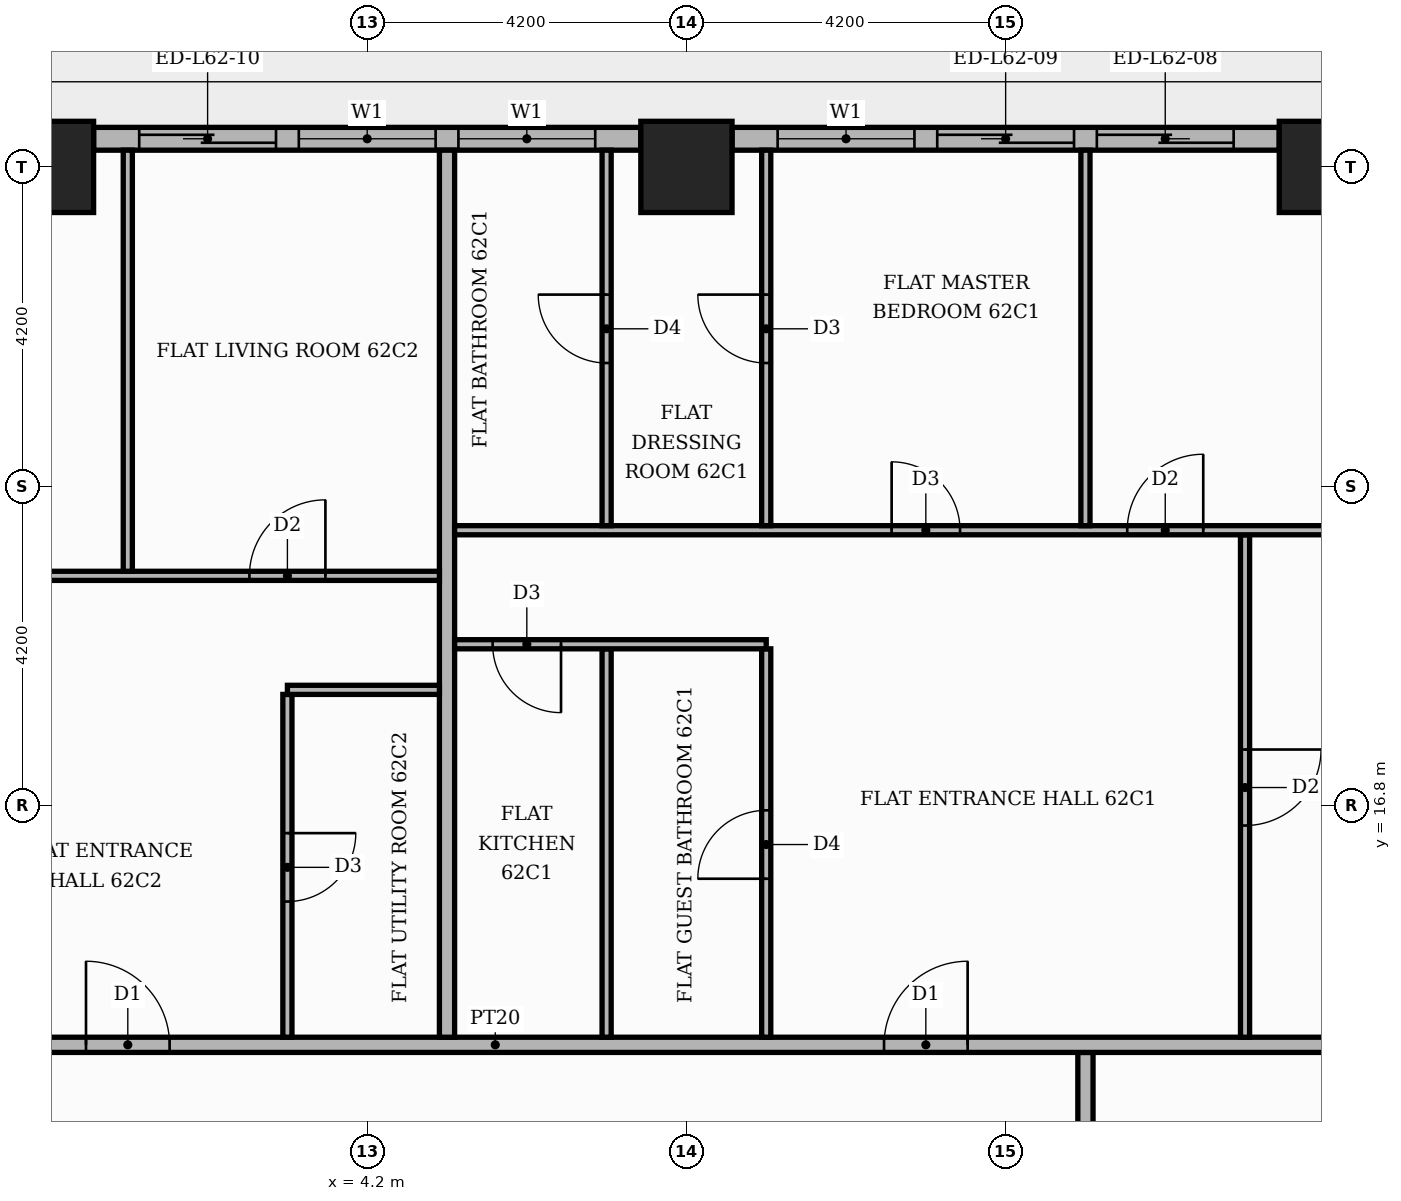
"""IFC4 building model, lengths in metres.
Left out: names, types, materials, properties, quantities, classifications, styles, units other than length and angle.
Written with IfcOpenShell. Run it as: python <this file> out.ifc"""

import sys

from ifc_helpers import new_model, si_unit, direction, frame, frame_2d, origin, origin_2d, place, context, subcontext, project, spatial, rectangle, extrude, element, fill, save


model = new_model("IFC4")
c1 = context("Model", 3, precision=1e-05, world=origin(), true_north=direction((0.0, 1.0)))
c2 = subcontext(c1, "Body", "Model", "MODEL_VIEW")
j1 = project(units=[si_unit("LENGTHUNIT", "METRE"), si_unit("PLANEANGLEUNIT", "RADIAN")], contexts=[c1])
p1 = place(None, origin())
s1 = spatial("IfcSite", under=j1, at=p1, CompositionType="ELEMENT")
p2 = place(p1, origin())
s2 = spatial("IfcBuilding", under=s1, at=p2, CompositionType="ELEMENT")
p3 = place(p2, frame((0.0, 0.0, 260.1)))
s3 = spatial("IfcBuildingStorey", under=s2, at=p3, CompositionType="ELEMENT", Elevation=260.1)
for number, where, z_axis, x_axis in (
    (1, (0.0, 25.2, 0.0), (0.0, 0.0, 1.0), (1.0, 0.0, 0.0)),
    (2, (8.4, 25.2, 0.0), (0.0, 0.0, 1.0), (1.0, 0.0, 0.0)),
    (3, (16.8, 25.2, 0.0), (0.0, 0.0, 1.0), (1.0, 0.0, 0.0)),
):
    element("IfcColumn", number, at=place(p3, frame(where, z_axis=z_axis, x_axis=x_axis)), inside=s3, PredefinedType="COLUMN", context=c2, shape_type="SweptSolid", body=[
        extrude(rectangle(XDim=1.2, YDim=1.2, at=origin_2d()), origin(), (0.0, 0.0, 1.0), 3.9),
    ])
p4 = place(p3, frame((16.2, 25.57, 0.0), z_axis=(0.0, 0.0, 1.0), x_axis=(-1.0, 0.0, 0.0)))
e4 = element("IfcWall", 4, at=p4, inside=s3, PredefinedType="STANDARD", context=c2, shape_type="SweptSolid", body=[
    extrude(rectangle(XDim=7.2, YDim=0.3, at=frame_2d((3.6, 0.0))), origin(), (0.0, 0.0, 1.0), 3.48),
])
p5 = place(p4, frame((0.6, 0.0, 0.0)))
e5 = element("IfcOpeningElement", 5, at=p5, cuts=e4, PredefinedType="OPENING", context=c2, shape_type="SweptSolid", body=[
    extrude(rectangle(XDim=1.8, YDim=2.4, at=frame_2d((0.9, 1.2))), frame((0.0, 0.16, 0.0), z_axis=(0.0, -1.0, 0.0), x_axis=(1.0, 0.0, 0.0)), (0.0, 0.0, 1.0), 0.32),
])
p6 = place(p4, frame((2.7, 0.0, 0.0)))
e6 = element("IfcOpeningElement", 6, at=p6, cuts=e4, PredefinedType="OPENING", context=c2, shape_type="SweptSolid", body=[
    extrude(rectangle(XDim=1.8, YDim=2.4, at=frame_2d((0.9, 1.2))), frame((0.0, 0.16, 0.0), z_axis=(0.0, -1.0, 0.0), x_axis=(1.0, 0.0, 0.0)), (0.0, 0.0, 1.0), 0.32),
])
p7 = place(p4, frame((4.8, 0.0, 0.9)))
e7 = element("IfcOpeningElement", 7, at=p7, cuts=e4, PredefinedType="OPENING", context=c2, shape_type="SweptSolid", body=[
    extrude(rectangle(XDim=1.8, YDim=2.1, at=frame_2d((0.9, 1.05))), frame((0.0, 0.16, 0.0), z_axis=(0.0, -1.0, 0.0), x_axis=(1.0, 0.0, 0.0)), (0.0, 0.0, 1.0), 0.32),
])
p8 = place(p3, frame((7.8, 25.57, 0.0), z_axis=(0.0, 0.0, 1.0), x_axis=(-1.0, 0.0, 0.0)))
e8 = element("IfcWall", 8, at=p8, inside=s3, PredefinedType="STANDARD", context=c2, shape_type="SweptSolid", body=[
    extrude(rectangle(XDim=7.2, YDim=0.3, at=frame_2d((3.6, 0.0))), origin(), (0.0, 0.0, 1.0), 3.48),
])
p9 = place(p8, frame((0.6, 0.0, 0.9)))
e9 = element("IfcOpeningElement", 9, at=p9, cuts=e8, PredefinedType="OPENING", context=c2, shape_type="SweptSolid", body=[
    extrude(rectangle(XDim=1.8, YDim=2.1, at=frame_2d((0.9, 1.05))), frame((0.0, 0.16, 0.0), z_axis=(0.0, -1.0, 0.0), x_axis=(1.0, 0.0, 0.0)), (0.0, 0.0, 1.0), 0.32),
])
p10 = place(p8, frame((2.7, 0.0, 0.9)))
e10 = element("IfcOpeningElement", 10, at=p10, cuts=e8, PredefinedType="OPENING", context=c2, shape_type="SweptSolid", body=[
    extrude(rectangle(XDim=1.8, YDim=2.1, at=frame_2d((0.9, 1.05))), frame((0.0, 0.16, 0.0), z_axis=(0.0, -1.0, 0.0), x_axis=(1.0, 0.0, 0.0)), (0.0, 0.0, 1.0), 0.32),
])
p11 = place(p8, frame((4.8, 0.0, 0.0)))
e11 = element("IfcOpeningElement", 11, at=p11, cuts=e8, PredefinedType="OPENING", context=c2, shape_type="SweptSolid", body=[
    extrude(rectangle(XDim=1.8, YDim=2.4, at=frame_2d((0.9, 1.2))), frame((0.0, 0.16, 0.0), z_axis=(0.0, -1.0, 0.0), x_axis=(1.0, 0.0, 0.0)), (0.0, 0.0, 1.0), 0.32),
])
p12 = place(p3, frame((13.65, 11.1, 0.0), z_axis=(0.0, 0.0, 1.0), x_axis=(0.0, 1.0, 0.0)))
e12 = element("IfcWall", 12, at=p12, inside=s3, PredefinedType="PARTITIONING", context=c2, shape_type="SweptSolid", body=[
    extrude(rectangle(XDim=2.45, YDim=0.2, at=frame_2d((1.225, 0.0))), origin(), (0.0, 0.0, 1.0), 3.48),
])
p13 = place(p3, frame((-13.65, 13.65, 0.0), z_axis=(0.0, 0.0, 1.0), x_axis=(1.0, 0.0, 0.0)))
e13 = element("IfcWall", 13, at=p13, inside=s3, PredefinedType="PARTITIONING", context=c2, shape_type="SweptSolid", body=[
    extrude(rectangle(XDim=39.07, YDim=0.2, at=frame_2d((19.535, 0.0))), origin(), (0.0, 0.0, 1.0), 3.48),
])
p14 = place(p13, frame((24.65, 0.0, 0.0)))
e14 = element("IfcOpeningElement", 14, at=p14, cuts=e13, PredefinedType="OPENING", context=c2, shape_type="SweptSolid", body=[
    extrude(rectangle(XDim=1.1, YDim=2.4, at=frame_2d((0.55, 1.2))), frame((0.0, 0.11, 0.0), z_axis=(0.0, -1.0, 0.0), x_axis=(1.0, 0.0, 0.0)), (0.0, 0.0, 1.0), 0.22),
])
p15 = place(p13, frame((14.15, 0.0, 0.0)))
e15 = element("IfcOpeningElement", 15, at=p15, cuts=e13, PredefinedType="OPENING", context=c2, shape_type="SweptSolid", body=[
    extrude(rectangle(XDim=1.1, YDim=2.4, at=frame_2d((0.55, 1.2))), frame((0.0, 0.11, 0.0), z_axis=(0.0, -1.0, 0.0), x_axis=(1.0, 0.0, 0.0)), (0.0, 0.0, 1.0), 0.22),
])
p16 = place(p3, frame((3.15, 13.75, 0.0), z_axis=(0.0, 0.0, 1.0), x_axis=(0.0, 1.0, 0.0)))
e16 = element("IfcWall", 16, at=p16, inside=s3, PredefinedType="PARTITIONING", context=c2, shape_type="SweptSolid", body=[
    extrude(rectangle(XDim=4.51, YDim=0.12, at=frame_2d((2.255, 0.0))), origin(), (0.0, 0.0, 1.0), 3.48),
])
p17 = place(p16, frame((1.785, 0.0, 0.0)))
e17 = element("IfcOpeningElement", 17, at=p17, cuts=e16, PredefinedType="OPENING", context=c2, shape_type="SweptSolid", body=[
    extrude(rectangle(XDim=0.9, YDim=2.1, at=frame_2d((0.45, 1.05))), frame((0.0, 0.07, 0.0), z_axis=(0.0, -1.0, 0.0), x_axis=(1.0, 0.0, 0.0)), (0.0, 0.0, 1.0), 0.14),
])
p18 = place(p3, frame((5.25, 13.75, 0.0), z_axis=(0.0, 0.0, 1.0), x_axis=(0.0, 1.0, 0.0)))
e18 = element("IfcWall", 18, at=p18, inside=s3, PredefinedType="PARTITIONING", context=c2, shape_type="SweptSolid", body=[
    extrude(rectangle(XDim=11.67, YDim=0.2, at=frame_2d((5.835, 0.0))), origin(), (0.0, 0.0, 1.0), 3.48),
])
p19 = place(p3, frame((7.35, 13.75, 0.0), z_axis=(0.0, 0.0, 1.0), x_axis=(0.0, 1.0, 0.0)))
e19 = element("IfcWall", 19, at=p19, inside=s3, PredefinedType="PARTITIONING", context=c2, shape_type="SweptSolid", body=[
    extrude(rectangle(XDim=5.11, YDim=0.12, at=frame_2d((2.555, 0.0))), origin(), (0.0, 0.0, 1.0), 3.48),
])
p20 = place(p3, frame((9.45, 13.75, 0.0), z_axis=(0.0, 0.0, 1.0), x_axis=(0.0, 1.0, 0.0)))
e20 = element("IfcWall", 20, at=p20, inside=s3, PredefinedType="PARTITIONING", context=c2, shape_type="SweptSolid", body=[
    extrude(rectangle(XDim=5.11, YDim=0.12, at=frame_2d((2.555, 0.0))), origin(), (0.0, 0.0, 1.0), 3.48),
])
p21 = place(p20, frame((2.085, 0.0, 0.0)))
e21 = element("IfcOpeningElement", 21, at=p21, cuts=e20, PredefinedType="OPENING", context=c2, shape_type="SweptSolid", body=[
    extrude(rectangle(XDim=0.9, YDim=2.1, at=frame_2d((0.45, 1.05))), frame((0.0, 0.07, 0.0), z_axis=(0.0, -1.0, 0.0), x_axis=(1.0, 0.0, 0.0)), (0.0, 0.0, 1.0), 0.14),
])
p22 = place(p3, frame((15.75, 13.75, 0.0), z_axis=(0.0, 0.0, 1.0), x_axis=(0.0, 1.0, 0.0)))
e22 = element("IfcWall", 22, at=p22, inside=s3, PredefinedType="PARTITIONING", context=c2, shape_type="SweptSolid", body=[
    extrude(rectangle(XDim=6.61, YDim=0.12, at=frame_2d((3.305, 0.0))), origin(), (0.0, 0.0, 1.0), 3.48),
])
p23 = place(p22, frame((2.785, 0.0, 0.0)))
e23 = element("IfcOpeningElement", 23, at=p23, cuts=e22, PredefinedType="OPENING", context=c2, shape_type="SweptSolid", body=[
    extrude(rectangle(XDim=1.0, YDim=2.1, at=frame_2d((0.5, 1.05))), frame((0.0, 0.07, 0.0), z_axis=(0.0, -1.0, 0.0), x_axis=(1.0, 0.0, 0.0)), (0.0, 0.0, 1.0), 0.14),
])
p24 = place(p3, frame((3.15, 18.32, 0.0), z_axis=(0.0, 0.0, 1.0), x_axis=(1.0, 0.0, 0.0)))
e24 = element("IfcWall", 24, at=p24, inside=s3, PredefinedType="PARTITIONING", context=c2, shape_type="SweptSolid", body=[
    extrude(rectangle(XDim=2.0, YDim=0.12, at=frame_2d((1.0, 0.0))), origin(), (0.0, 0.0, 1.0), 3.48),
])
p25 = place(p3, frame((5.35, 18.92, 0.0), z_axis=(0.0, 0.0, 1.0), x_axis=(1.0, 0.0, 0.0)))
e25 = element("IfcWall", 25, at=p25, inside=s3, PredefinedType="PARTITIONING", context=c2, shape_type="SweptSolid", body=[
    extrude(rectangle(XDim=4.1, YDim=0.12, at=frame_2d((2.05, 0.0))), origin(), (0.0, 0.0, 1.0), 3.48),
])
p26 = place(p25, frame((0.5, 0.0, 0.0)))
e26 = element("IfcOpeningElement", 26, at=p26, cuts=e25, PredefinedType="OPENING", context=c2, shape_type="SweptSolid", body=[
    extrude(rectangle(XDim=0.9, YDim=2.1, at=frame_2d((0.45, 1.05))), frame((0.0, 0.07, 0.0), z_axis=(0.0, -1.0, 0.0), x_axis=(1.0, 0.0, 0.0)), (0.0, 0.0, 1.0), 0.14),
])
p27 = place(p3, frame((-13.55, 19.82, 0.0), z_axis=(0.0, 0.0, 1.0), x_axis=(1.0, 0.0, 0.0)))
e27 = element("IfcWall", 27, at=p27, inside=s3, PredefinedType="PARTITIONING", context=c2, shape_type="SweptSolid", body=[
    extrude(rectangle(XDim=18.7, YDim=0.12, at=frame_2d((9.35, 0.0))), origin(), (0.0, 0.0, 1.0), 3.48),
])
p28 = place(p27, frame((16.2, 0.0, 0.0)))
e28 = element("IfcOpeningElement", 28, at=p28, cuts=e27, PredefinedType="OPENING", context=c2, shape_type="SweptSolid", body=[
    extrude(rectangle(XDim=1.0, YDim=2.1, at=frame_2d((0.5, 1.05))), frame((0.0, 0.07, 0.0), z_axis=(0.0, -1.0, 0.0), x_axis=(1.0, 0.0, 0.0)), (0.0, 0.0, 1.0), 0.14),
])
p29 = place(p27, frame((12.05, 0.0, 0.0)))
e29 = element("IfcOpeningElement", 29, at=p29, cuts=e27, PredefinedType="OPENING", context=c2, shape_type="SweptSolid", body=[
    extrude(rectangle(XDim=0.9, YDim=2.1, at=frame_2d((0.45, 1.05))), frame((0.0, 0.07, 0.0), z_axis=(0.0, -1.0, 0.0), x_axis=(1.0, 0.0, 0.0)), (0.0, 0.0, 1.0), 0.14),
])
p30 = place(p27, frame((3.65, 0.0, 0.0)))
e30 = element("IfcOpeningElement", 30, at=p30, cuts=e27, PredefinedType="OPENING", context=c2, shape_type="SweptSolid", body=[
    extrude(rectangle(XDim=0.9, YDim=2.1, at=frame_2d((0.45, 1.05))), frame((0.0, 0.07, 0.0), z_axis=(0.0, -1.0, 0.0), x_axis=(1.0, 0.0, 0.0)), (0.0, 0.0, 1.0), 0.14),
])
p31 = place(p3, frame((1.05, 19.88, 0.0), z_axis=(0.0, 0.0, 1.0), x_axis=(0.0, 1.0, 0.0)))
e31 = element("IfcWall", 31, at=p31, inside=s3, PredefinedType="PARTITIONING", context=c2, shape_type="SweptSolid", body=[
    extrude(rectangle(XDim=5.54, YDim=0.12, at=frame_2d((2.77, 0.0))), origin(), (0.0, 0.0, 1.0), 3.48),
])
p32 = place(p3, frame((5.35, 20.42, 0.0), z_axis=(0.0, 0.0, 1.0), x_axis=(1.0, 0.0, 0.0)))
e32 = element("IfcWall", 32, at=p32, inside=s3, PredefinedType="PARTITIONING", context=c2, shape_type="SweptSolid", body=[
    extrude(rectangle(XDim=15.369, YDim=0.12, at=frame_2d((7.685, 0.0))), origin(), (0.0, 0.0, 1.0), 3.48),
])
p33 = place(p32, frame((8.85, 0.0, 0.0)))
e33 = element("IfcOpeningElement", 33, at=p33, cuts=e32, PredefinedType="OPENING", context=c2, shape_type="SweptSolid", body=[
    extrude(rectangle(XDim=1.0, YDim=2.1, at=frame_2d((0.5, 1.05))), frame((0.0, 0.07, 0.0), z_axis=(0.0, -1.0, 0.0), x_axis=(1.0, 0.0, 0.0)), (0.0, 0.0, 1.0), 0.14),
])
p34 = place(p32, frame((5.75, 0.0, 0.0)))
e34 = element("IfcOpeningElement", 34, at=p34, cuts=e32, PredefinedType="OPENING", context=c2, shape_type="SweptSolid", body=[
    extrude(rectangle(XDim=0.9, YDim=2.1, at=frame_2d((0.45, 1.05))), frame((0.0, 0.07, 0.0), z_axis=(0.0, -1.0, 0.0), x_axis=(1.0, 0.0, 0.0)), (0.0, 0.0, 1.0), 0.14),
])
p35 = place(p3, frame((7.35, 20.48, 0.0), z_axis=(0.0, 0.0, 1.0), x_axis=(0.0, 1.0, 0.0)))
e35 = element("IfcWall", 35, at=p35, inside=s3, PredefinedType="PARTITIONING", context=c2, shape_type="SweptSolid", body=[
    extrude(rectangle(XDim=4.94, YDim=0.12, at=frame_2d((2.47, 0.0))), origin(), (0.0, 0.0, 1.0), 3.48),
])
p36 = place(p35, frame((2.14, 0.0, 0.0)))
e36 = element("IfcOpeningElement", 36, at=p36, cuts=e35, PredefinedType="OPENING", context=c2, shape_type="SweptSolid", body=[
    extrude(rectangle(XDim=0.9, YDim=2.1, at=frame_2d((0.45, 1.05))), frame((0.0, 0.07, 0.0), z_axis=(0.0, -1.0, 0.0), x_axis=(1.0, 0.0, 0.0)), (0.0, 0.0, 1.0), 0.14),
])
p37 = place(p3, frame((9.45, 20.48, 0.0), z_axis=(0.0, 0.0, 1.0), x_axis=(0.0, 1.0, 0.0)))
e37 = element("IfcWall", 37, at=p37, inside=s3, PredefinedType="PARTITIONING", context=c2, shape_type="SweptSolid", body=[
    extrude(rectangle(XDim=4.94, YDim=0.12, at=frame_2d((2.47, 0.0))), origin(), (0.0, 0.0, 1.0), 3.48),
])
p38 = place(p37, frame((2.14, 0.0, 0.0)))
e38 = element("IfcOpeningElement", 38, at=p38, cuts=e37, PredefinedType="OPENING", context=c2, shape_type="SweptSolid", body=[
    extrude(rectangle(XDim=0.9, YDim=2.1, at=frame_2d((0.45, 1.05))), frame((0.0, 0.07, 0.0), z_axis=(0.0, -1.0, 0.0), x_axis=(1.0, 0.0, 0.0)), (0.0, 0.0, 1.0), 0.14),
])
p39 = place(p3, frame((13.65, 20.48, 0.0), z_axis=(0.0, 0.0, 1.0), x_axis=(0.0, 1.0, 0.0)))
e39 = element("IfcWall", 39, at=p39, inside=s3, PredefinedType="PARTITIONING", context=c2, shape_type="SweptSolid", body=[
    extrude(rectangle(XDim=4.94, YDim=0.12, at=frame_2d((2.47, 0.0))), origin(), (0.0, 0.0, 1.0), 3.48),
])
p40 = place(p5, origin())
e40 = element("IfcDoor", 40, at=p40, inside=s3, OperationType="SLIDING_TO_LEFT", PredefinedType="DOOR", context=c2, shape_type="SweptSolid", body=[
    extrude(rectangle(XDim=1.8, YDim=2.4, at=frame_2d((0.9, 1.2))), frame((0.0, 0.025, 0.0), z_axis=(0.0, -1.0, 0.0), x_axis=(1.0, 0.0, 0.0)), (0.0, 0.0, 1.0), 0.05),
])
fill(e5, e40)
p41 = place(p6, origin())
e41 = element("IfcDoor", 41, at=p41, inside=s3, OperationType="SLIDING_TO_RIGHT", PredefinedType="DOOR", context=c2, shape_type="SweptSolid", body=[
    extrude(rectangle(XDim=1.8, YDim=2.4, at=frame_2d((0.9, 1.2))), frame((0.0, 0.025, 0.0), z_axis=(0.0, -1.0, 0.0), x_axis=(1.0, 0.0, 0.0)), (0.0, 0.0, 1.0), 0.05),
])
fill(e6, e41)
p42 = place(p7, origin())
e42 = element("IfcWindow", 42, at=p42, inside=s3, PartitioningType="SINGLE_PANEL", PredefinedType="WINDOW", context=c2, shape_type="SweptSolid", body=[
    extrude(rectangle(XDim=1.8, YDim=2.1, at=frame_2d((0.9, 1.05))), frame((0.0, 0.03, 0.0), z_axis=(0.0, -1.0, 0.0), x_axis=(1.0, 0.0, 0.0)), (0.0, 0.0, 1.0), 0.06),
])
fill(e7, e42)
p43 = place(p9, origin())
e43 = element("IfcWindow", 43, at=p43, inside=s3, PartitioningType="SINGLE_PANEL", PredefinedType="WINDOW", context=c2, shape_type="SweptSolid", body=[
    extrude(rectangle(XDim=1.8, YDim=2.1, at=frame_2d((0.9, 1.05))), frame((0.0, 0.03, 0.0), z_axis=(0.0, -1.0, 0.0), x_axis=(1.0, 0.0, 0.0)), (0.0, 0.0, 1.0), 0.06),
])
fill(e9, e43)
p44 = place(p10, origin())
e44 = element("IfcWindow", 44, at=p44, inside=s3, PartitioningType="SINGLE_PANEL", PredefinedType="WINDOW", context=c2, shape_type="SweptSolid", body=[
    extrude(rectangle(XDim=1.8, YDim=2.1, at=frame_2d((0.9, 1.05))), frame((0.0, 0.03, 0.0), z_axis=(0.0, -1.0, 0.0), x_axis=(1.0, 0.0, 0.0)), (0.0, 0.0, 1.0), 0.06),
])
fill(e10, e44)
p45 = place(p11, origin())
e45 = element("IfcDoor", 45, at=p45, inside=s3, OperationType="SLIDING_TO_RIGHT", PredefinedType="DOOR", context=c2, shape_type="SweptSolid", body=[
    extrude(rectangle(XDim=1.8, YDim=2.4, at=frame_2d((0.9, 1.2))), frame((0.0, 0.025, 0.0), z_axis=(0.0, -1.0, 0.0), x_axis=(1.0, 0.0, 0.0)), (0.0, 0.0, 1.0), 0.05),
])
fill(e11, e45)
p46 = place(p14, origin())
e46 = element("IfcDoor", 46, at=p46, inside=s3, OperationType="SINGLE_SWING_RIGHT", PredefinedType="DOOR", context=c2, shape_type="SweptSolid", body=[
    extrude(rectangle(XDim=1.1, YDim=2.4, at=frame_2d((0.55, 1.2))), frame((0.0, 0.025, 0.0), z_axis=(0.0, -1.0, 0.0), x_axis=(1.0, 0.0, 0.0)), (0.0, 0.0, 1.0), 0.05),
])
fill(e14, e46)
p47 = place(p23, frame((1.0, 0.0, 0.0), z_axis=(0.0, 0.0, 1.0), x_axis=(-1.0, 0.0, 0.0)))
e47 = element("IfcDoor", 47, at=p47, inside=s3, OperationType="SINGLE_SWING_RIGHT", PredefinedType="DOOR", context=c2, shape_type="SweptSolid", body=[
    extrude(rectangle(XDim=1.0, YDim=2.1, at=frame_2d((0.5, 1.05))), frame((0.0, 0.025, 0.0), z_axis=(0.0, -1.0, 0.0), x_axis=(1.0, 0.0, 0.0)), (0.0, 0.0, 1.0), 0.05),
])
fill(e23, e47)
p48 = place(p21, origin())
e48 = element("IfcDoor", 48, at=p48, inside=s3, OperationType="SINGLE_SWING_LEFT", PredefinedType="DOOR", context=c2, shape_type="SweptSolid", body=[
    extrude(rectangle(XDim=0.9, YDim=2.1, at=frame_2d((0.45, 1.05))), frame((0.0, 0.025, 0.0), z_axis=(0.0, -1.0, 0.0), x_axis=(1.0, 0.0, 0.0)), (0.0, 0.0, 1.0), 0.05),
])
fill(e21, e48)
p49 = place(p26, frame((0.9, 0.0, 0.0), z_axis=(0.0, 0.0, 1.0), x_axis=(-1.0, 0.0, 0.0)))
e49 = element("IfcDoor", 49, at=p49, inside=s3, OperationType="SINGLE_SWING_RIGHT", PredefinedType="DOOR", context=c2, shape_type="SweptSolid", body=[
    extrude(rectangle(XDim=0.9, YDim=2.1, at=frame_2d((0.45, 1.05))), frame((0.0, 0.025, 0.0), z_axis=(0.0, -1.0, 0.0), x_axis=(1.0, 0.0, 0.0)), (0.0, 0.0, 1.0), 0.05),
])
fill(e26, e49)
p50 = place(p33, origin())
e50 = element("IfcDoor", 50, at=p50, inside=s3, OperationType="SINGLE_SWING_RIGHT", PredefinedType="DOOR", context=c2, shape_type="SweptSolid", body=[
    extrude(rectangle(XDim=1.0, YDim=2.1, at=frame_2d((0.5, 1.05))), frame((0.0, 0.025, 0.0), z_axis=(0.0, -1.0, 0.0), x_axis=(1.0, 0.0, 0.0)), (0.0, 0.0, 1.0), 0.05),
])
fill(e33, e50)
p51 = place(p34, origin())
e51 = element("IfcDoor", 51, at=p51, inside=s3, OperationType="SINGLE_SWING_LEFT", PredefinedType="DOOR", context=c2, shape_type="SweptSolid", body=[
    extrude(rectangle(XDim=0.9, YDim=2.1, at=frame_2d((0.45, 1.05))), frame((0.0, 0.025, 0.0), z_axis=(0.0, -1.0, 0.0), x_axis=(1.0, 0.0, 0.0)), (0.0, 0.0, 1.0), 0.05),
])
fill(e34, e51)
p52 = place(p38, origin())
e52 = element("IfcDoor", 52, at=p52, inside=s3, OperationType="SINGLE_SWING_RIGHT", PredefinedType="DOOR", context=c2, shape_type="SweptSolid", body=[
    extrude(rectangle(XDim=0.9, YDim=2.1, at=frame_2d((0.45, 1.05))), frame((0.0, 0.025, 0.0), z_axis=(0.0, -1.0, 0.0), x_axis=(1.0, 0.0, 0.0)), (0.0, 0.0, 1.0), 0.05),
])
fill(e38, e52)
p53 = place(p36, origin())
e53 = element("IfcDoor", 53, at=p53, inside=s3, OperationType="SINGLE_SWING_RIGHT", PredefinedType="DOOR", context=c2, shape_type="SweptSolid", body=[
    extrude(rectangle(XDim=0.9, YDim=2.1, at=frame_2d((0.45, 1.05))), frame((0.0, 0.025, 0.0), z_axis=(0.0, -1.0, 0.0), x_axis=(1.0, 0.0, 0.0)), (0.0, 0.0, 1.0), 0.05),
])
fill(e36, e53)
p54 = place(p15, origin())
e54 = element("IfcDoor", 54, at=p54, inside=s3, OperationType="SINGLE_SWING_LEFT", PredefinedType="DOOR", context=c2, shape_type="SweptSolid", body=[
    extrude(rectangle(XDim=1.1, YDim=2.4, at=frame_2d((0.55, 1.2))), frame((0.0, 0.025, 0.0), z_axis=(0.0, -1.0, 0.0), x_axis=(1.0, 0.0, 0.0)), (0.0, 0.0, 1.0), 0.05),
])
fill(e15, e54)
p55 = place(p17, frame((0.9, 0.0, 0.0), z_axis=(0.0, 0.0, 1.0), x_axis=(-1.0, 0.0, 0.0)))
e55 = element("IfcDoor", 55, at=p55, inside=s3, OperationType="SINGLE_SWING_RIGHT", PredefinedType="DOOR", context=c2, shape_type="SweptSolid", body=[
    extrude(rectangle(XDim=0.9, YDim=2.1, at=frame_2d((0.45, 1.05))), frame((0.0, 0.025, 0.0), z_axis=(0.0, -1.0, 0.0), x_axis=(1.0, 0.0, 0.0)), (0.0, 0.0, 1.0), 0.05),
])
fill(e17, e55)
p56 = place(p28, origin())
e56 = element("IfcDoor", 56, at=p56, inside=s3, OperationType="SINGLE_SWING_RIGHT", PredefinedType="DOOR", context=c2, shape_type="SweptSolid", body=[
    extrude(rectangle(XDim=1.0, YDim=2.1, at=frame_2d((0.5, 1.05))), frame((0.0, 0.025, 0.0), z_axis=(0.0, -1.0, 0.0), x_axis=(1.0, 0.0, 0.0)), (0.0, 0.0, 1.0), 0.05),
])
fill(e28, e56)
save(model, sys.argv[1])
